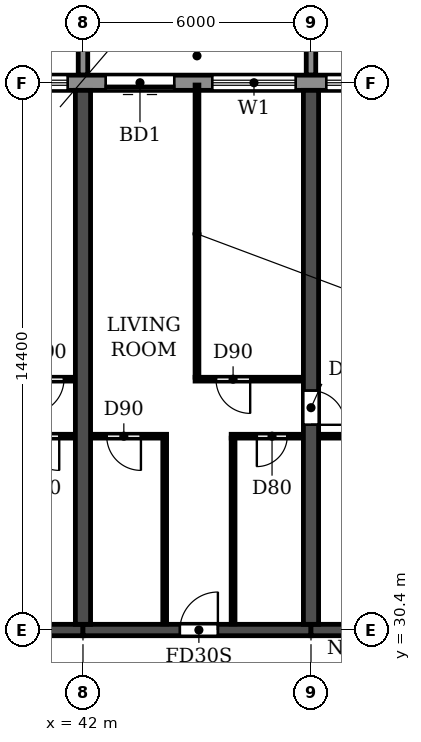
"""IFC4 building model, lengths in metres.
Left out: names, types, materials, properties, quantities, classifications, styles, units other than length and angle.
Written with IfcOpenShell. Run it as: python <this file> out.ifc"""

import sys

from ifc_helpers import new_model, si_unit, direction, frame, frame_2d, origin, place, context, subcontext, project, spatial, polyline, rectangle, outline, extrude, source, transform, mapped, element, fill, save


model = new_model("IFC4")
c1 = context("Model", 3, precision=1e-05, world=origin(), true_north=direction((0.0, 1.0)))
c2 = subcontext(c1, "Body", "Model", "MODEL_VIEW")
j1 = project(units=[si_unit("LENGTHUNIT", "METRE"), si_unit("PLANEANGLEUNIT", "RADIAN")], contexts=[c1])
p1 = place(None, origin())
s1 = spatial("IfcSite", under=j1, at=p1, CompositionType="ELEMENT")
p2 = place(p1, origin())
s2 = spatial("IfcBuilding", under=s1, at=p2, CompositionType="ELEMENT")
p3 = place(p2, frame((0.0, 0.0, 63.0)))
s3 = spatial("IfcBuildingStorey", under=s2, at=p3, CompositionType="ELEMENT", Elevation=63.0)
p4 = place(p3, frame((42.0, 30.55, 0.0), z_axis=(0.0, 0.0, 1.0), x_axis=(0.0, 1.0, 0.0)))
e1 = element("IfcWall", 1, at=p4, inside=s3, PredefinedType="SHEAR", context=c2, shape_type="SweptSolid", body=[
    extrude(rectangle(XDim=14.05, YDim=0.4, at=frame_2d((7.025, 0.0))), origin(), (0.0, 0.0, 1.0), 2.95),
])
p5 = place(p3, frame((48.0, 30.55, 0.0), z_axis=(0.0, 0.0, 1.0), x_axis=(0.0, 1.0, 0.0)))
e2 = element("IfcWall", 2, at=p5, inside=s3, PredefinedType="SHEAR", context=c2, shape_type="SweptSolid", body=[
    extrude(rectangle(XDim=14.05, YDim=0.4, at=frame_2d((7.025, 0.0))), origin(), (0.0, 0.0, 1.0), 2.95),
])
p6 = place(p5, frame((5.25, 0.0, 0.0)))
e3 = element("IfcOpeningElement", 3, at=p6, cuts=e2, PredefinedType="OPENING", context=c2, shape_type="SweptSolid", body=[
    extrude(rectangle(XDim=0.9, YDim=2.1, at=frame_2d((0.45, 1.05))), frame((0.0, 0.21, 0.0), z_axis=(0.0, -1.0, 0.0), x_axis=(1.0, 0.0, 0.0)), (0.0, 0.0, 1.0), 0.42),
])
p7 = place(p3, frame((36.0, 30.4, 0.0), z_axis=(0.0, 0.0, 1.0), x_axis=(1.0, 0.0, 0.0)))
e4 = element("IfcWall", 4, at=p7, inside=s3, PredefinedType="SHEAR", context=c2, shape_type="SweptSolid", body=[
    extrude(rectangle(XDim=6.0, YDim=0.3, at=frame_2d((3.0, 0.0))), origin(), (0.0, 0.0, 1.0), 2.35),
])
p8 = place(p7, frame((2.45, 0.0, 0.0)))
e5 = element("IfcOpeningElement", 5, at=p8, cuts=e4, PredefinedType="OPENING", context=c2, shape_type="SweptSolid", body=[
    extrude(rectangle(XDim=1.0, YDim=2.1, at=frame_2d((0.5, 1.05))), frame((0.0, 0.16, 0.0), z_axis=(0.0, -1.0, 0.0), x_axis=(1.0, 0.0, 0.0)), (0.0, 0.0, 1.0), 0.32),
])
p9 = place(p3, frame((42.0, 30.4, 0.0), z_axis=(0.0, 0.0, 1.0), x_axis=(1.0, 0.0, 0.0)))
e6 = element("IfcWall", 6, at=p9, inside=s3, PredefinedType="SHEAR", context=c2, shape_type="SweptSolid", body=[
    extrude(rectangle(XDim=6.0, YDim=0.3, at=frame_2d((3.0, 0.0))), origin(), (0.0, 0.0, 1.0), 2.35),
])
p10 = place(p9, frame((2.55, 0.0, 0.0)))
e7 = element("IfcOpeningElement", 7, at=p10, cuts=e6, PredefinedType="OPENING", context=c2, shape_type="SweptSolid", body=[
    extrude(rectangle(XDim=1.0, YDim=2.1, at=frame_2d((0.5, 1.05))), frame((0.0, 0.16, 0.0), z_axis=(0.0, -1.0, 0.0), x_axis=(1.0, 0.0, 0.0)), (0.0, 0.0, 1.0), 0.32),
])
p11 = place(p3, frame((48.0, 30.4, 0.0), z_axis=(0.0, 0.0, 1.0), x_axis=(1.0, 0.0, 0.0)))
e8 = element("IfcWall", 8, at=p11, inside=s3, PredefinedType="SHEAR", context=c2, shape_type="SweptSolid", body=[
    extrude(rectangle(XDim=6.0, YDim=0.3, at=frame_2d((3.0, 0.0))), origin(), (0.0, 0.0, 1.0), 2.35),
])
p12 = place(p3, frame((91.317, 44.8, 0.0), z_axis=(0.0, 0.0, 1.0), x_axis=(-1.0, 0.0, 0.0)))
e9 = element("IfcWall", 9, at=p12, inside=s3, PredefinedType="STANDARD", context=c2, shape_type="SweptSolid", body=[
    extrude(rectangle(XDim=80.634, YDim=0.4, at=frame_2d((40.317, 0.0))), origin(), (0.0, 0.0, 1.0), 2.95),
])
p13 = place(p12, frame((76.717, 0.0, 0.9)))
e10 = element("IfcOpeningElement", 10, at=p13, cuts=e9, PredefinedType="OPENING", context=c2, shape_type="SweptSolid", body=[
    extrude(rectangle(XDim=2.2, YDim=1.5, at=frame_2d((1.1, 0.75))), frame((0.0, 0.21, 0.0), z_axis=(0.0, -1.0, 0.0), x_axis=(1.0, 0.0, 0.0)), (0.0, 0.0, 1.0), 0.42),
])
p14 = place(p12, frame((73.917, 0.0, 0.0)))
e11 = element("IfcOpeningElement", 11, at=p14, cuts=e9, PredefinedType="OPENING", context=c2, shape_type="SweptSolid", body=[
    extrude(rectangle(XDim=1.8, YDim=2.4, at=frame_2d((0.9, 1.2))), frame((0.0, 0.21, 0.0), z_axis=(0.0, -1.0, 0.0), x_axis=(1.0, 0.0, 0.0)), (0.0, 0.0, 1.0), 0.42),
])
p15 = place(p12, frame((70.717, 0.0, 0.9)))
e12 = element("IfcOpeningElement", 12, at=p15, cuts=e9, PredefinedType="OPENING", context=c2, shape_type="SweptSolid", body=[
    extrude(rectangle(XDim=2.2, YDim=1.5, at=frame_2d((1.1, 0.75))), frame((0.0, 0.21, 0.0), z_axis=(0.0, -1.0, 0.0), x_axis=(1.0, 0.0, 0.0)), (0.0, 0.0, 1.0), 0.42),
])
p16 = place(p12, frame((67.917, 0.0, 0.0)))
e13 = element("IfcOpeningElement", 13, at=p16, cuts=e9, PredefinedType="OPENING", context=c2, shape_type="SweptSolid", body=[
    extrude(rectangle(XDim=1.8, YDim=2.4, at=frame_2d((0.9, 1.2))), frame((0.0, 0.21, 0.0), z_axis=(0.0, -1.0, 0.0), x_axis=(1.0, 0.0, 0.0)), (0.0, 0.0, 1.0), 0.42),
])
p17 = place(p12, frame((64.717, 0.0, 0.9)))
e14 = element("IfcOpeningElement", 14, at=p17, cuts=e9, PredefinedType="OPENING", context=c2, shape_type="SweptSolid", body=[
    extrude(rectangle(XDim=2.2, YDim=1.5, at=frame_2d((1.1, 0.75))), frame((0.0, 0.21, 0.0), z_axis=(0.0, -1.0, 0.0), x_axis=(1.0, 0.0, 0.0)), (0.0, 0.0, 1.0), 0.42),
])
p18 = place(p12, frame((61.917, 0.0, 0.0)))
e15 = element("IfcOpeningElement", 15, at=p18, cuts=e9, PredefinedType="OPENING", context=c2, shape_type="SweptSolid", body=[
    extrude(rectangle(XDim=1.8, YDim=2.4, at=frame_2d((0.9, 1.2))), frame((0.0, 0.21, 0.0), z_axis=(0.0, -1.0, 0.0), x_axis=(1.0, 0.0, 0.0)), (0.0, 0.0, 1.0), 0.42),
])
p19 = place(p12, frame((58.717, 0.0, 0.9)))
e16 = element("IfcOpeningElement", 16, at=p19, cuts=e9, PredefinedType="OPENING", context=c2, shape_type="SweptSolid", body=[
    extrude(rectangle(XDim=2.2, YDim=1.5, at=frame_2d((1.1, 0.75))), frame((0.0, 0.21, 0.0), z_axis=(0.0, -1.0, 0.0), x_axis=(1.0, 0.0, 0.0)), (0.0, 0.0, 1.0), 0.42),
])
p20 = place(p12, frame((55.717, 0.0, 0.9)))
e17 = element("IfcOpeningElement", 17, at=p20, cuts=e9, PredefinedType="OPENING", context=c2, shape_type="SweptSolid", body=[
    extrude(rectangle(XDim=2.2, YDim=1.5, at=frame_2d((1.1, 0.75))), frame((0.0, 0.21, 0.0), z_axis=(0.0, -1.0, 0.0), x_axis=(1.0, 0.0, 0.0)), (0.0, 0.0, 1.0), 0.42),
])
p21 = place(p12, frame((52.917, 0.0, 0.0)))
e18 = element("IfcOpeningElement", 18, at=p21, cuts=e9, PredefinedType="OPENING", context=c2, shape_type="SweptSolid", body=[
    extrude(rectangle(XDim=1.8, YDim=2.4, at=frame_2d((0.9, 1.2))), frame((0.0, 0.21, 0.0), z_axis=(0.0, -1.0, 0.0), x_axis=(1.0, 0.0, 0.0)), (0.0, 0.0, 1.0), 0.42),
])
p22 = place(p12, frame((49.717, 0.0, 0.9)))
e19 = element("IfcOpeningElement", 19, at=p22, cuts=e9, PredefinedType="OPENING", context=c2, shape_type="SweptSolid", body=[
    extrude(rectangle(XDim=2.2, YDim=1.5, at=frame_2d((1.1, 0.75))), frame((0.0, 0.21, 0.0), z_axis=(0.0, -1.0, 0.0), x_axis=(1.0, 0.0, 0.0)), (0.0, 0.0, 1.0), 0.42),
])
p23 = place(p12, frame((46.917, 0.0, 0.0)))
e20 = element("IfcOpeningElement", 20, at=p23, cuts=e9, PredefinedType="OPENING", context=c2, shape_type="SweptSolid", body=[
    extrude(rectangle(XDim=1.8, YDim=2.4, at=frame_2d((0.9, 1.2))), frame((0.0, 0.21, 0.0), z_axis=(0.0, -1.0, 0.0), x_axis=(1.0, 0.0, 0.0)), (0.0, 0.0, 1.0), 0.42),
])
p24 = place(p12, frame((43.717, 0.0, 0.9)))
e21 = element("IfcOpeningElement", 21, at=p24, cuts=e9, PredefinedType="OPENING", context=c2, shape_type="SweptSolid", body=[
    extrude(rectangle(XDim=2.2, YDim=1.5, at=frame_2d((1.1, 0.75))), frame((0.0, 0.21, 0.0), z_axis=(0.0, -1.0, 0.0), x_axis=(1.0, 0.0, 0.0)), (0.0, 0.0, 1.0), 0.42),
])
p25 = place(p12, frame((40.717, 0.0, 0.9)))
e22 = element("IfcOpeningElement", 22, at=p25, cuts=e9, PredefinedType="OPENING", context=c2, shape_type="SweptSolid", body=[
    extrude(rectangle(XDim=2.2, YDim=1.5, at=frame_2d((1.1, 0.75))), frame((0.0, 0.21, 0.0), z_axis=(0.0, -1.0, 0.0), x_axis=(1.0, 0.0, 0.0)), (0.0, 0.0, 1.0), 0.42),
])
p26 = place(p12, frame((37.717, 0.0, 0.9)))
e23 = element("IfcOpeningElement", 23, at=p26, cuts=e9, PredefinedType="OPENING", context=c2, shape_type="SweptSolid", body=[
    extrude(rectangle(XDim=2.2, YDim=1.5, at=frame_2d((1.1, 0.75))), frame((0.0, 0.21, 0.0), z_axis=(0.0, -1.0, 0.0), x_axis=(1.0, 0.0, 0.0)), (0.0, 0.0, 1.0), 0.42),
])
p27 = place(p12, frame((34.717, 0.0, 0.9)))
e24 = element("IfcOpeningElement", 24, at=p27, cuts=e9, PredefinedType="OPENING", context=c2, shape_type="SweptSolid", body=[
    extrude(rectangle(XDim=2.2, YDim=1.5, at=frame_2d((1.1, 0.75))), frame((0.0, 0.21, 0.0), z_axis=(0.0, -1.0, 0.0), x_axis=(1.0, 0.0, 0.0)), (0.0, 0.0, 1.0), 0.42),
])
p28 = place(p12, frame((31.917, 0.0, 0.0)))
e25 = element("IfcOpeningElement", 25, at=p28, cuts=e9, PredefinedType="OPENING", context=c2, shape_type="SweptSolid", body=[
    extrude(rectangle(XDim=1.8, YDim=2.4, at=frame_2d((0.9, 1.2))), frame((0.0, 0.21, 0.0), z_axis=(0.0, -1.0, 0.0), x_axis=(1.0, 0.0, 0.0)), (0.0, 0.0, 1.0), 0.42),
])
p29 = place(p12, frame((28.917, 0.0, 0.0)))
e26 = element("IfcOpeningElement", 26, at=p29, cuts=e9, PredefinedType="OPENING", context=c2, shape_type="SweptSolid", body=[
    extrude(rectangle(XDim=1.8, YDim=2.4, at=frame_2d((0.9, 1.2))), frame((0.0, 0.21, 0.0), z_axis=(0.0, -1.0, 0.0), x_axis=(1.0, 0.0, 0.0)), (0.0, 0.0, 1.0), 0.42),
])
p30 = place(p12, frame((25.717, 0.0, 0.9)))
e27 = element("IfcOpeningElement", 27, at=p30, cuts=e9, PredefinedType="OPENING", context=c2, shape_type="SweptSolid", body=[
    extrude(rectangle(XDim=2.2, YDim=1.5, at=frame_2d((1.1, 0.75))), frame((0.0, 0.21, 0.0), z_axis=(0.0, -1.0, 0.0), x_axis=(1.0, 0.0, 0.0)), (0.0, 0.0, 1.0), 0.42),
])
p31 = place(p12, frame((22.917, 0.0, 0.0)))
e28 = element("IfcOpeningElement", 28, at=p31, cuts=e9, PredefinedType="OPENING", context=c2, shape_type="SweptSolid", body=[
    extrude(rectangle(XDim=1.8, YDim=2.4, at=frame_2d((0.9, 1.2))), frame((0.0, 0.21, 0.0), z_axis=(0.0, -1.0, 0.0), x_axis=(1.0, 0.0, 0.0)), (0.0, 0.0, 1.0), 0.42),
])
p32 = place(p12, frame((19.717, 0.0, 0.9)))
e29 = element("IfcOpeningElement", 29, at=p32, cuts=e9, PredefinedType="OPENING", context=c2, shape_type="SweptSolid", body=[
    extrude(rectangle(XDim=2.2, YDim=1.5, at=frame_2d((1.1, 0.75))), frame((0.0, 0.21, 0.0), z_axis=(0.0, -1.0, 0.0), x_axis=(1.0, 0.0, 0.0)), (0.0, 0.0, 1.0), 0.42),
])
p33 = place(p12, frame((16.917, 0.0, 0.0)))
e30 = element("IfcOpeningElement", 30, at=p33, cuts=e9, PredefinedType="OPENING", context=c2, shape_type="SweptSolid", body=[
    extrude(rectangle(XDim=1.8, YDim=2.4, at=frame_2d((0.9, 1.2))), frame((0.0, 0.21, 0.0), z_axis=(0.0, -1.0, 0.0), x_axis=(1.0, 0.0, 0.0)), (0.0, 0.0, 1.0), 0.42),
])
p34 = place(p12, frame((13.717, 0.0, 0.9)))
e31 = element("IfcOpeningElement", 31, at=p34, cuts=e9, PredefinedType="OPENING", context=c2, shape_type="SweptSolid", body=[
    extrude(rectangle(XDim=2.2, YDim=1.5, at=frame_2d((1.1, 0.75))), frame((0.0, 0.21, 0.0), z_axis=(0.0, -1.0, 0.0), x_axis=(1.0, 0.0, 0.0)), (0.0, 0.0, 1.0), 0.42),
])
p35 = place(p12, frame((10.917, 0.0, 0.0)))
e32 = element("IfcOpeningElement", 32, at=p35, cuts=e9, PredefinedType="OPENING", context=c2, shape_type="SweptSolid", body=[
    extrude(rectangle(XDim=1.8, YDim=2.4, at=frame_2d((0.9, 1.2))), frame((0.0, 0.21, 0.0), z_axis=(0.0, -1.0, 0.0), x_axis=(1.0, 0.0, 0.0)), (0.0, 0.0, 1.0), 0.42),
])
p36 = place(p12, frame((7.717, 0.0, 0.9)))
e33 = element("IfcOpeningElement", 33, at=p36, cuts=e9, PredefinedType="OPENING", context=c2, shape_type="SweptSolid", body=[
    extrude(rectangle(XDim=2.2, YDim=1.5, at=frame_2d((1.1, 0.75))), frame((0.0, 0.21, 0.0), z_axis=(0.0, -1.0, 0.0), x_axis=(1.0, 0.0, 0.0)), (0.0, 0.0, 1.0), 0.42),
])
p37 = place(p12, frame((4.717, 0.0, 0.9)))
e34 = element("IfcOpeningElement", 34, at=p37, cuts=e9, PredefinedType="OPENING", context=c2, shape_type="SweptSolid", body=[
    extrude(rectangle(XDim=2.2, YDim=1.5, at=frame_2d((1.1, 0.75))), frame((0.0, 0.21, 0.0), z_axis=(0.0, -1.0, 0.0), x_axis=(1.0, 0.0, 0.0)), (0.0, 0.0, 1.0), 0.42),
])
p38 = place(p12, frame((1.717, 0.0, 0.9)))
e35 = element("IfcOpeningElement", 35, at=p38, cuts=e9, PredefinedType="OPENING", context=c2, shape_type="SweptSolid", body=[
    extrude(rectangle(XDim=2.2, YDim=1.5, at=frame_2d((1.1, 0.75))), frame((0.0, 0.21, 0.0), z_axis=(0.0, -1.0, 0.0), x_axis=(1.0, 0.0, 0.0)), (0.0, 0.0, 1.0), 0.42),
])
m1 = source(origin(), c2, "Body", "SweptSolid", [
    extrude(outline(polyline([(0.0, 0.0), (0.25, 0.0), (0.25, 3.1), (0.0, 3.1), (0.0, 0.0)])), origin(), (0.0, 0.0, 1.0), 3.1),
])
for number, where in (
    (36, (41.875, 45.0, 0.0)),
    (37, (47.875, 45.0, 0.0)),
):
    element("IfcWall", number, at=place(p3, frame(where)), inside=s3, PredefinedType="STANDARD", context=c2, shape_type="MappedRepresentation", body=[
        mapped(m1, transform((0.0, 0.0, 0.0))),
    ])
p39 = place(p3, frame((39.8, 35.5, 0.0), z_axis=(0.0, 0.0, 1.0), x_axis=(1.0, 0.0, 0.0)))
e38 = element("IfcWall", 38, at=p39, inside=s3, PredefinedType="PARTITIONING", context=c2, shape_type="SweptSolid", body=[
    extrude(rectangle(XDim=1.99, YDim=0.1, at=frame_2d((0.995, 0.0))), origin(), (0.0, 0.0, 1.0), 2.95),
])
p40 = place(p39, frame((0.675, 0.0, 0.0)))
e39 = element("IfcOpeningElement", 39, at=p40, cuts=e38, PredefinedType="OPENING", context=c2, shape_type="SweptSolid", body=[
    extrude(rectangle(XDim=0.9, YDim=2.1, at=frame_2d((0.45, 1.05))), frame((0.0, 0.06, 0.0), z_axis=(0.0, -1.0, 0.0), x_axis=(1.0, 0.0, 0.0)), (0.0, 0.0, 1.0), 0.12),
])
p41 = place(p3, frame((42.21, 35.5, 0.0), z_axis=(0.0, 0.0, 1.0), x_axis=(1.0, 0.0, 0.0)))
e40 = element("IfcWall", 40, at=p41, inside=s3, PredefinedType="PARTITIONING", context=c2, shape_type="SweptSolid", body=[
    extrude(rectangle(XDim=1.99, YDim=0.1, at=frame_2d((0.995, 0.0))), origin(), (0.0, 0.0, 1.0), 2.95),
])
p42 = place(p41, frame((0.415, 0.0, 0.0)))
e41 = element("IfcOpeningElement", 41, at=p42, cuts=e40, PredefinedType="OPENING", context=c2, shape_type="SweptSolid", body=[
    extrude(rectangle(XDim=0.9, YDim=2.1, at=frame_2d((0.45, 1.05))), frame((0.0, 0.06, 0.0), z_axis=(0.0, -1.0, 0.0), x_axis=(1.0, 0.0, 0.0)), (0.0, 0.0, 1.0), 0.12),
])
p43 = place(p3, frame((45.9, 35.5, 0.0), z_axis=(0.0, 0.0, 1.0), x_axis=(1.0, 0.0, 0.0)))
e42 = element("IfcWall", 42, at=p43, inside=s3, PredefinedType="PARTITIONING", context=c2, shape_type="SweptSolid", body=[
    extrude(rectangle(XDim=1.89, YDim=0.1, at=frame_2d((0.945, 0.0))), origin(), (0.0, 0.0, 1.0), 2.95),
])
p44 = place(p43, frame((0.675, 0.0, 0.0)))
e43 = element("IfcOpeningElement", 43, at=p44, cuts=e42, PredefinedType="OPENING", context=c2, shape_type="SweptSolid", body=[
    extrude(rectangle(XDim=0.8, YDim=2.1, at=frame_2d((0.4, 1.05))), frame((0.0, 0.06, 0.0), z_axis=(0.0, -1.0, 0.0), x_axis=(1.0, 0.0, 0.0)), (0.0, 0.0, 1.0), 0.12),
])
p45 = place(p3, frame((48.21, 35.5, 0.0), z_axis=(0.0, 0.0, 1.0), x_axis=(1.0, 0.0, 0.0)))
e44 = element("IfcWall", 44, at=p45, inside=s3, PredefinedType="PARTITIONING", context=c2, shape_type="SweptSolid", body=[
    extrude(rectangle(XDim=2.69, YDim=0.1, at=frame_2d((1.345, 0.0))), origin(), (0.0, 0.0, 1.0), 2.95),
])
p46 = place(p45, frame((0.89, 0.0, 0.0)))
e45 = element("IfcOpeningElement", 45, at=p46, cuts=e44, PredefinedType="OPENING", context=c2, shape_type="SweptSolid", body=[
    extrude(rectangle(XDim=0.8, YDim=2.1, at=frame_2d((0.4, 1.05))), frame((0.0, 0.06, 0.0), z_axis=(0.0, -1.0, 0.0), x_axis=(1.0, 0.0, 0.0)), (0.0, 0.0, 1.0), 0.12),
])
p47 = place(p3, frame((38.95, 37.0, 0.0), z_axis=(0.0, 0.0, 1.0), x_axis=(1.0, 0.0, 0.0)))
e46 = element("IfcWall", 46, at=p47, inside=s3, PredefinedType="PARTITIONING", context=c2, shape_type="SweptSolid", body=[
    extrude(rectangle(XDim=2.84, YDim=0.1, at=frame_2d((1.42, 0.0))), origin(), (0.0, 0.0, 1.0), 2.95),
])
p48 = place(p47, frame((1.65, 0.0, 0.0)))
e47 = element("IfcOpeningElement", 47, at=p48, cuts=e46, PredefinedType="OPENING", context=c2, shape_type="SweptSolid", body=[
    extrude(rectangle(XDim=0.9, YDim=2.1, at=frame_2d((0.45, 1.05))), frame((0.0, 0.06, 0.0), z_axis=(0.0, -1.0, 0.0), x_axis=(1.0, 0.0, 0.0)), (0.0, 0.0, 1.0), 0.12),
])
p49 = place(p3, frame((44.95, 37.0, 0.0), z_axis=(0.0, 0.0, 1.0), x_axis=(1.0, 0.0, 0.0)))
e48 = element("IfcWall", 48, at=p49, inside=s3, PredefinedType="PARTITIONING", context=c2, shape_type="SweptSolid", body=[
    extrude(rectangle(XDim=2.84, YDim=0.1, at=frame_2d((1.42, 0.0))), origin(), (0.0, 0.0, 1.0), 2.95),
])
p50 = place(p49, frame((0.55, 0.0, 0.0)))
e49 = element("IfcOpeningElement", 49, at=p50, cuts=e48, PredefinedType="OPENING", context=c2, shape_type="SweptSolid", body=[
    extrude(rectangle(XDim=0.9, YDim=2.1, at=frame_2d((0.45, 1.05))), frame((0.0, 0.06, 0.0), z_axis=(0.0, -1.0, 0.0), x_axis=(1.0, 0.0, 0.0)), (0.0, 0.0, 1.0), 0.12),
])
p51 = place(p3, frame((44.15, 30.56, 0.0), z_axis=(0.0, 0.0, 1.0), x_axis=(0.0, 1.0, 0.0)))
e50 = element("IfcWall", 50, at=p51, inside=s3, PredefinedType="PARTITIONING", context=c2, shape_type="SweptSolid", body=[
    extrude(rectangle(XDim=4.89, YDim=0.1, at=frame_2d((2.445, 0.0))), origin(), (0.0, 0.0, 1.0), 2.95),
])
p52 = place(p3, frame((45.0, 37.05, 0.0), z_axis=(0.0, 0.0, 1.0), x_axis=(0.0, 1.0, 0.0)))
e51 = element("IfcWall", 51, at=p52, inside=s3, PredefinedType="PARTITIONING", context=c2, shape_type="SweptSolid", body=[
    extrude(rectangle(XDim=7.69, YDim=0.1, at=frame_2d((3.845, 0.0))), origin(), (0.0, 0.0, 1.0), 2.95),
])
p53 = place(p3, frame((45.95, 30.56, 0.0), z_axis=(0.0, 0.0, 1.0), x_axis=(0.0, 1.0, 0.0)))
e52 = element("IfcWall", 52, at=p53, inside=s3, PredefinedType="PARTITIONING", context=c2, shape_type="SweptSolid", body=[
    extrude(rectangle(XDim=4.89, YDim=0.1, at=frame_2d((2.445, 0.0))), origin(), (0.0, 0.0, 1.0), 2.95),
])
p54 = place(p22, origin())
e53 = element("IfcWindow", 53, at=p54, inside=s3, PartitioningType="DOUBLE_PANEL_HORIZONTAL", PredefinedType="WINDOW", context=c2, shape_type="SweptSolid", body=[
    extrude(rectangle(XDim=2.2, YDim=1.5, at=frame_2d((1.1, 0.75))), frame((0.0, 0.03, 0.0), z_axis=(0.0, -1.0, 0.0), x_axis=(1.0, 0.0, 0.0)), (0.0, 0.0, 1.0), 0.06),
])
fill(e19, e53)
p55 = place(p23, origin())
e54 = element("IfcDoor", 54, at=p55, inside=s3, OperationType="DOUBLE_DOOR_SLIDING", PredefinedType="DOOR", context=c2, shape_type="SweptSolid", body=[
    extrude(rectangle(XDim=1.8, YDim=2.4, at=frame_2d((0.9, 1.2))), frame((0.0, 0.025, 0.0), z_axis=(0.0, -1.0, 0.0), x_axis=(1.0, 0.0, 0.0)), (0.0, 0.0, 1.0), 0.05),
])
fill(e20, e54)
p56 = place(p24, origin())
e55 = element("IfcWindow", 55, at=p56, inside=s3, PartitioningType="DOUBLE_PANEL_HORIZONTAL", PredefinedType="WINDOW", context=c2, shape_type="SweptSolid", body=[
    extrude(rectangle(XDim=2.2, YDim=1.5, at=frame_2d((1.1, 0.75))), frame((0.0, 0.03, 0.0), z_axis=(0.0, -1.0, 0.0), x_axis=(1.0, 0.0, 0.0)), (0.0, 0.0, 1.0), 0.06),
])
fill(e21, e55)
p57 = place(p25, origin())
e56 = element("IfcWindow", 56, at=p57, inside=s3, PartitioningType="DOUBLE_PANEL_HORIZONTAL", PredefinedType="WINDOW", context=c2, shape_type="SweptSolid", body=[
    extrude(rectangle(XDim=2.2, YDim=1.5, at=frame_2d((1.1, 0.75))), frame((0.0, 0.03, 0.0), z_axis=(0.0, -1.0, 0.0), x_axis=(1.0, 0.0, 0.0)), (0.0, 0.0, 1.0), 0.06),
])
fill(e22, e56)
p58 = place(p40, frame((0.9, 0.0, 0.0), z_axis=(0.0, 0.0, 1.0), x_axis=(-1.0, 0.0, 0.0)))
e57 = element("IfcDoor", 57, at=p58, inside=s3, OperationType="SINGLE_SWING_LEFT", PredefinedType="DOOR", context=c2, shape_type="SweptSolid", body=[
    extrude(rectangle(XDim=0.9, YDim=2.1, at=frame_2d((0.45, 1.05))), frame((0.0, 0.025, 0.0), z_axis=(0.0, -1.0, 0.0), x_axis=(1.0, 0.0, 0.0)), (0.0, 0.0, 1.0), 0.05),
])
fill(e39, e57)
p59 = place(p48, frame((0.9, 0.0, 0.0), z_axis=(0.0, 0.0, 1.0), x_axis=(-1.0, 0.0, 0.0)))
e58 = element("IfcDoor", 58, at=p59, inside=s3, OperationType="SINGLE_SWING_RIGHT", PredefinedType="DOOR", context=c2, shape_type="SweptSolid", body=[
    extrude(rectangle(XDim=0.9, YDim=2.1, at=frame_2d((0.45, 1.05))), frame((0.0, 0.025, 0.0), z_axis=(0.0, -1.0, 0.0), x_axis=(1.0, 0.0, 0.0)), (0.0, 0.0, 1.0), 0.05),
])
fill(e47, e58)
p60 = place(p42, frame((0.9, 0.0, 0.0), z_axis=(0.0, 0.0, 1.0), x_axis=(-1.0, 0.0, 0.0)))
e59 = element("IfcDoor", 59, at=p60, inside=s3, OperationType="SINGLE_SWING_LEFT", PredefinedType="DOOR", context=c2, shape_type="SweptSolid", body=[
    extrude(rectangle(XDim=0.9, YDim=2.1, at=frame_2d((0.45, 1.05))), frame((0.0, 0.025, 0.0), z_axis=(0.0, -1.0, 0.0), x_axis=(1.0, 0.0, 0.0)), (0.0, 0.0, 1.0), 0.05),
])
fill(e41, e59)
p61 = place(p10, origin())
e60 = element("IfcDoor", 60, at=p61, inside=s3, OperationType="SINGLE_SWING_RIGHT", PredefinedType="DOOR", context=c2, shape_type="SweptSolid", body=[
    extrude(rectangle(XDim=1.0, YDim=2.1, at=frame_2d((0.5, 1.05))), frame((0.0, 0.025, 0.0), z_axis=(0.0, -1.0, 0.0), x_axis=(1.0, 0.0, 0.0)), (0.0, 0.0, 1.0), 0.05),
])
fill(e7, e60)
p62 = place(p50, frame((0.9, 0.0, 0.0), z_axis=(0.0, 0.0, 1.0), x_axis=(-1.0, 0.0, 0.0)))
e61 = element("IfcDoor", 61, at=p62, inside=s3, OperationType="SINGLE_SWING_LEFT", PredefinedType="DOOR", context=c2, shape_type="SweptSolid", body=[
    extrude(rectangle(XDim=0.9, YDim=2.1, at=frame_2d((0.45, 1.05))), frame((0.0, 0.025, 0.0), z_axis=(0.0, -1.0, 0.0), x_axis=(1.0, 0.0, 0.0)), (0.0, 0.0, 1.0), 0.05),
])
fill(e49, e61)
p63 = place(p44, frame((0.8, 0.0, 0.0), z_axis=(0.0, 0.0, 1.0), x_axis=(-1.0, 0.0, 0.0)))
e62 = element("IfcDoor", 62, at=p63, inside=s3, OperationType="SINGLE_SWING_RIGHT", PredefinedType="DOOR", context=c2, shape_type="SweptSolid", body=[
    extrude(rectangle(XDim=0.8, YDim=2.1, at=frame_2d((0.4, 1.05))), frame((0.0, 0.025, 0.0), z_axis=(0.0, -1.0, 0.0), x_axis=(1.0, 0.0, 0.0)), (0.0, 0.0, 1.0), 0.05),
])
fill(e43, e62)
p64 = place(p6, frame((0.9, 0.0, 0.0), z_axis=(0.0, 0.0, 1.0), x_axis=(-1.0, 0.0, 0.0)))
e63 = element("IfcDoor", 63, at=p64, inside=s3, OperationType="SINGLE_SWING_RIGHT", PredefinedType="DOOR", context=c2, shape_type="SweptSolid", body=[
    extrude(rectangle(XDim=0.9, YDim=2.1, at=frame_2d((0.45, 1.05))), frame((0.0, 0.025, 0.0), z_axis=(0.0, -1.0, 0.0), x_axis=(1.0, 0.0, 0.0)), (0.0, 0.0, 1.0), 0.05),
])
fill(e3, e63)
save(model, sys.argv[1])
